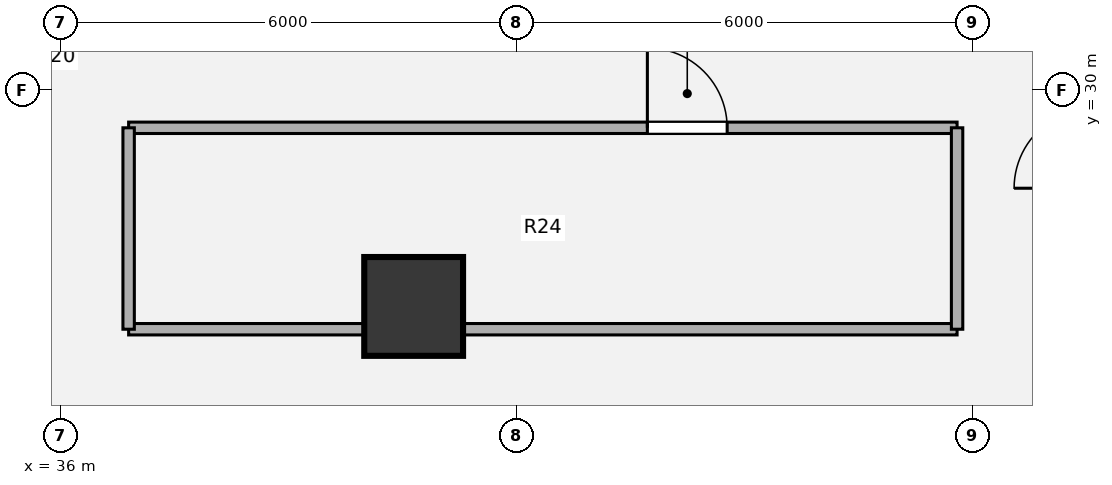
"""IFC4 building model, lengths in metres.
Left out: names, types, materials, properties, quantities, classifications, styles, units other than length and angle.
Written with IfcOpenShell. Run it as: python <this file> out.ifc"""

import sys

from ifc_helpers import new_model, si_unit, direction, frame, frame_2d, origin, origin_2d, place, context, subcontext, project, spatial, rectangle, hollow_circle, extrude, source, transform, mapped, element, fill, save


model = new_model("IFC4")
c1 = context("Model", 3, precision=1e-05, world=origin(), true_north=direction((0.0, 1.0)))
c2 = subcontext(c1, "Body", "Model", "MODEL_VIEW")
j1 = project(units=[si_unit("LENGTHUNIT", "METRE"), si_unit("PLANEANGLEUNIT", "RADIAN")], contexts=[c1])
p1 = place(None, origin())
s1 = spatial("IfcSite", under=j1, at=p1, CompositionType="ELEMENT")
p2 = place(p1, origin())
s2 = spatial("IfcBuilding", under=s1, at=p2, CompositionType="ELEMENT")
p3 = place(p2, frame((0.0, 0.0, 131.4)))
s3 = spatial("IfcBuildingStorey", under=s2, at=p3, CompositionType="ELEMENT", Elevation=131.4)
m1 = source(origin(), c2, "Body", "SweptSolid", [
    extrude(hollow_circle(Radius=0.65, WallThickness=0.045, at=origin_2d()), origin(), (0.0, 0.0, 1.0), 3.78),
])
p4 = place(p3, frame((40.65, 27.15, 0.0), z_axis=(0.0, 0.0, 1.0), x_axis=(1.0, 0.0, 0.0)))
e1 = element("IfcColumn", 1, at=p4, inside=s3, PredefinedType="COLUMN", context=c2, shape_type="MappedRepresentation", body=[
    mapped(m1, transform((0.0, 0.0, 0.0), x_axis=(1.0, 0.0, 0.0), y_axis=(0.0, 1.0, 0.0), z_axis=(0.0, 0.0, 1.0), scale=1.0)),
])
p5 = place(p3, frame((36.9, 26.85, 0.0), z_axis=(0.0, 0.0, 1.0), x_axis=(1.0, 0.0, 0.0)))
e2 = element("IfcWall", 2, at=p5, inside=s3, PredefinedType="PARTITIONING", context=c2, shape_type="SweptSolid", body=[
    extrude(rectangle(XDim=10.9, YDim=0.15, at=frame_2d((5.45, 0.0))), origin(), (0.0, 0.0, 1.0), 2.903),
])
p6 = place(p3, frame((36.9, 29.5, 0.0), z_axis=(0.0, 0.0, 1.0), x_axis=(1.0, 0.0, 0.0)))
e3 = element("IfcWall", 3, at=p6, inside=s3, PredefinedType="PARTITIONING", context=c2, shape_type="SweptSolid", body=[
    extrude(rectangle(XDim=10.9, YDim=0.15, at=frame_2d((5.45, 0.0))), origin(), (0.0, 0.0, 1.0), 2.982),
])
p7 = place(p6, frame((6.825, 0.0, 0.0)))
e4 = element("IfcOpeningElement", 4, at=p7, cuts=e3, PredefinedType="OPENING", context=c2, shape_type="SweptSolid", body=[
    extrude(rectangle(XDim=1.05, YDim=2.1, at=origin_2d()), frame((0.525, 0.085, 1.05), z_axis=(0.0, -1.0, 0.0), x_axis=(1.0, 0.0, 0.0)), (0.0, 0.0, 1.0), 0.17),
])
for number, where, z_axis, x_axis in (
    (5, (36.9, 26.85, 0.0), (0.0, 0.0, 1.0), (0.0, 1.0, 0.0)),
    (6, (47.8, 26.85, 0.0), (0.0, 0.0, 1.0), (0.0, 1.0, 0.0)),
):
    element("IfcWall", number, at=place(p3, frame(where, z_axis=z_axis, x_axis=x_axis)), inside=s3, PredefinedType="PARTITIONING", context=c2, shape_type="SweptSolid", body=[
        extrude(rectangle(XDim=2.65, YDim=0.15, at=frame_2d((1.325, 0.0))), origin(), (0.0, 0.0, 1.0), 3.5),
    ])
m2 = source(origin(), c2, "Body", "SweptSolid", [
    extrude(rectangle(XDim=1.05, YDim=2.1, at=origin_2d()), frame((0.525, 0.025, 1.05), z_axis=(0.0, -1.0, 0.0), x_axis=(1.0, 0.0, 0.0)), (0.0, 0.0, 1.0), 0.05),
])
p8 = place(p7, origin())
e7 = element("IfcDoor", 7, at=p8, inside=s3, OperationType="SINGLE_SWING_LEFT", PredefinedType="DOOR", context=c2, shape_type="MappedRepresentation", body=[
    mapped(m2, transform((0.0, 0.0, 0.0), x_axis=(1.0, 0.0, 0.0), y_axis=(0.0, 1.0, 0.0), z_axis=(0.0, 0.0, 1.0), scale=1.0)),
])
fill(e4, e7)
save(model, sys.argv[1])
